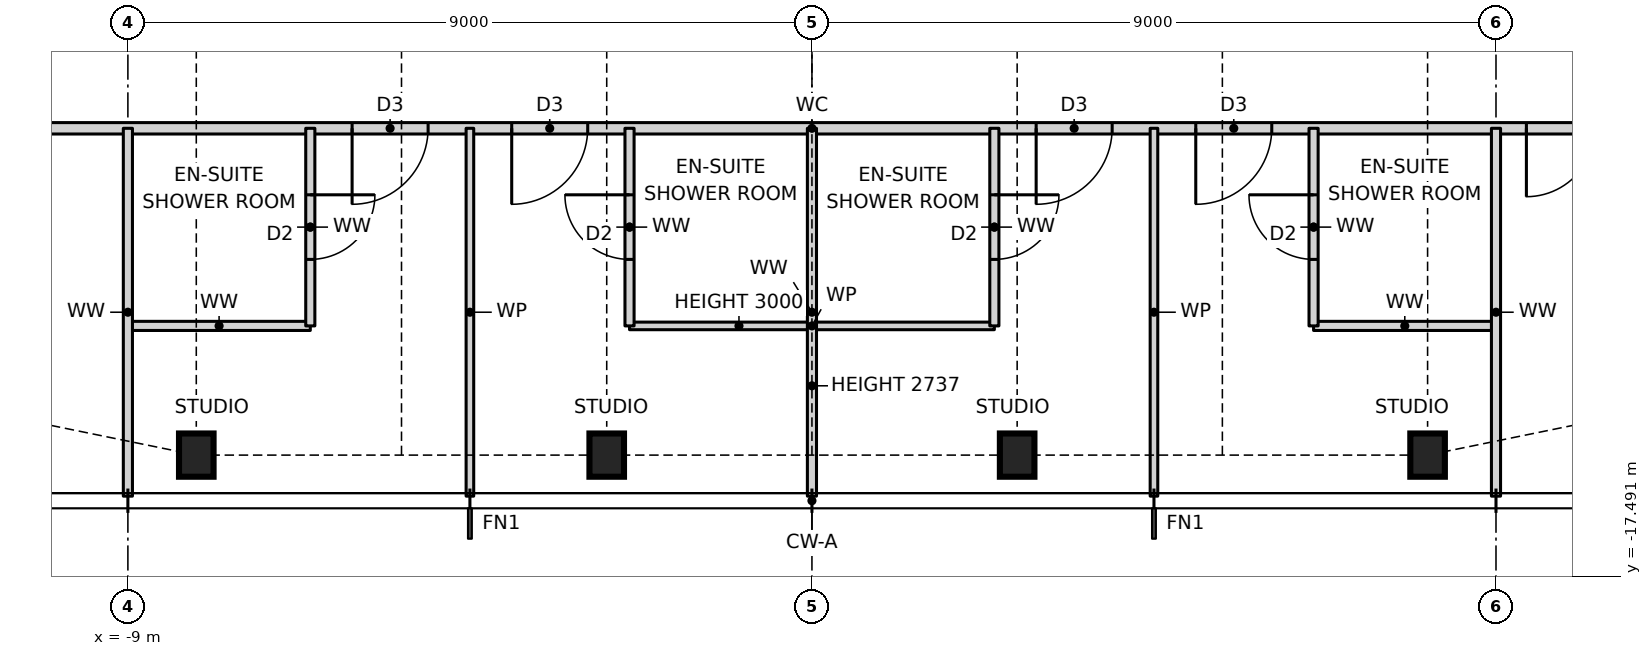
"""IFC4 building model, lengths in metres.
Left out: names, types, materials, properties, quantities, classifications, styles, units other than length and angle.
Written with IfcOpenShell. Run it as: python <this file> out.ifc"""

import sys

from ifc_helpers import new_model, si_unit, direction, frame, frame_2d, origin, origin_2d, place, context, subcontext, project, spatial, rectangle, i_section, extrude, element, fill, save


model = new_model("IFC4")
c1 = context("Model", 3, precision=1e-05, world=origin(), true_north=direction((0.0, 1.0)))
c2 = subcontext(c1, "Body", "Model", "MODEL_VIEW")
j1 = project(units=[si_unit("LENGTHUNIT", "METRE"), si_unit("PLANEANGLEUNIT", "RADIAN")], contexts=[c1])
p1 = place(None, origin())
s1 = spatial("IfcSite", under=j1, at=p1, CompositionType="ELEMENT")
p2 = place(p1, origin())
s2 = spatial("IfcBuilding", under=s1, at=p2, CompositionType="ELEMENT")
p3 = place(p2, frame((0.0, 0.0, 218.5)))
s3 = spatial("IfcBuildingStorey", under=s2, at=p3, CompositionType="ELEMENT", Elevation=218.5)
for number, where, z_axis, x_axis in (
    (1, (-8.1, -15.9, 0.0), (0.0, 0.0, 1.0), (1.0, 0.0, 0.0)),
    (2, (-2.7, -15.9, 0.0), (0.0, 0.0, 1.0), (1.0, 0.0, 0.0)),
    (3, (2.7, -15.9, 0.0), (0.0, 0.0, 1.0), (1.0, 0.0, 0.0)),
    (4, (8.1, -15.9, 0.0), (0.0, 0.0, 1.0), (1.0, 0.0, 0.0)),
):
    element("IfcColumn", number, at=place(p3, frame(where, z_axis=z_axis, x_axis=x_axis)), inside=s3, PredefinedType="COLUMN", context=c2, shape_type="SweptSolid", body=[
        extrude(i_section(OverallWidth=0.455, OverallDepth=0.569, WebThickness=0.078, FlangeThickness=0.125, at=origin_2d()), origin(), (0.0, 0.0, 1.0), 3.5),
    ])
p4 = place(p3, frame((-9.0, -14.2, 0.0), z_axis=(0.0, 0.0, 1.0), x_axis=(1.0, 0.0, 0.0)))
e5 = element("IfcWall", 5, at=p4, inside=s3, PredefinedType="PARTITIONING", context=c2, shape_type="SweptSolid", body=[
    extrude(rectangle(XDim=2.4, YDim=0.12, at=frame_2d((1.2, 0.0))), origin(), (0.0, 0.0, 1.0), 3.27),
])
p5 = place(p3, frame((-2.4, -14.2, 0.0), z_axis=(0.0, 0.0, 1.0), x_axis=(1.0, 0.0, 0.0)))
e6 = element("IfcWall", 6, at=p5, inside=s3, PredefinedType="PARTITIONING", context=c2, shape_type="SweptSolid", body=[
    extrude(rectangle(XDim=4.8, YDim=0.1, at=frame_2d((2.4, 0.0))), origin(), (0.0, 0.0, 1.0), 3.0),
])
p6 = place(p3, frame((6.6, -14.2, 0.0), z_axis=(0.0, 0.0, 1.0), x_axis=(1.0, 0.0, 0.0)))
e7 = element("IfcWall", 7, at=p6, inside=s3, PredefinedType="PARTITIONING", context=c2, shape_type="SweptSolid", body=[
    extrude(rectangle(XDim=2.4, YDim=0.12, at=frame_2d((1.2, 0.0))), origin(), (0.0, 0.0, 1.0), 3.27),
])
p7 = place(p3, frame((-11.6, -11.6, 0.0), z_axis=(0.0, 0.0, 1.0), x_axis=(1.0, 0.0, 0.0)))
e8 = element("IfcWall", 8, at=p7, inside=s3, PredefinedType="PARTITIONING", context=c2, shape_type="SweptSolid", body=[
    extrude(rectangle(XDim=23.2, YDim=0.15, at=frame_2d((11.6, 0.0))), origin(), (0.0, 0.0, 1.0), 3.27),
])
p8 = place(p7, frame((5.55, 0.0, 0.0)))
e9 = element("IfcOpeningElement", 9, at=p8, cuts=e8, PredefinedType="OPENING", context=c2, shape_type="SweptSolid", body=[
    extrude(rectangle(XDim=1.0, YDim=2.1, at=frame_2d((0.5, 1.05))), frame((0.0, 0.085, 0.0), z_axis=(0.0, -1.0, 0.0), x_axis=(1.0, 0.0, 0.0)), (0.0, 0.0, 1.0), 0.17),
])
p9 = place(p7, frame((7.65, 0.0, 0.0)))
e10 = element("IfcOpeningElement", 10, at=p9, cuts=e8, PredefinedType="OPENING", context=c2, shape_type="SweptSolid", body=[
    extrude(rectangle(XDim=1.0, YDim=2.1, at=frame_2d((0.5, 1.05))), frame((0.0, 0.085, 0.0), z_axis=(0.0, -1.0, 0.0), x_axis=(1.0, 0.0, 0.0)), (0.0, 0.0, 1.0), 0.17),
])
p10 = place(p7, frame((14.55, 0.0, 0.0)))
e11 = element("IfcOpeningElement", 11, at=p10, cuts=e8, PredefinedType="OPENING", context=c2, shape_type="SweptSolid", body=[
    extrude(rectangle(XDim=1.0, YDim=2.1, at=frame_2d((0.5, 1.05))), frame((0.0, 0.085, 0.0), z_axis=(0.0, -1.0, 0.0), x_axis=(1.0, 0.0, 0.0)), (0.0, 0.0, 1.0), 0.17),
])
p11 = place(p7, frame((16.65, 0.0, 0.0)))
e12 = element("IfcOpeningElement", 12, at=p11, cuts=e8, PredefinedType="OPENING", context=c2, shape_type="SweptSolid", body=[
    extrude(rectangle(XDim=1.0, YDim=2.1, at=frame_2d((0.5, 1.05))), frame((0.0, 0.085, 0.0), z_axis=(0.0, -1.0, 0.0), x_axis=(1.0, 0.0, 0.0)), (0.0, 0.0, 1.0), 0.17),
])
p12 = place(p7, frame((21.0, 0.0, 0.0)))
e13 = element("IfcOpeningElement", 13, at=p12, cuts=e8, PredefinedType="OPENING", context=c2, shape_type="SweptSolid", body=[
    extrude(rectangle(XDim=1.8, YDim=2.1, at=frame_2d((0.9, 1.05))), frame((0.0, 0.085, 0.0), z_axis=(0.0, -1.0, 0.0), x_axis=(1.0, 0.0, 0.0)), (0.0, 0.0, 1.0), 0.17),
])
p13 = place(p3, frame((9.0, -16.44, 0.0), z_axis=(0.0, 0.0, 1.0), x_axis=(0.0, 1.0, 0.0)))
e14 = element("IfcWall", 14, at=p13, inside=s3, PredefinedType="PARTITIONING", context=c2, shape_type="SweptSolid", body=[
    extrude(rectangle(XDim=4.84, YDim=0.12, at=frame_2d((2.42, 0.0))), origin(), (0.0, 0.0, 1.0), 3.27),
])
p14 = place(p3, frame((6.6, -14.2, 0.0), z_axis=(0.0, 0.0, 1.0), x_axis=(0.0, 1.0, 0.0)))
e15 = element("IfcWall", 15, at=p14, inside=s3, PredefinedType="PARTITIONING", context=c2, shape_type="SweptSolid", body=[
    extrude(rectangle(XDim=2.6, YDim=0.12, at=frame_2d((1.3, 0.0))), origin(), (0.0, 0.0, 1.0), 3.27),
])
p15 = place(p14, frame((0.875, 0.0, 0.0)))
e16 = element("IfcOpeningElement", 16, at=p15, cuts=e15, PredefinedType="OPENING", context=c2, shape_type="SweptSolid", body=[
    extrude(rectangle(XDim=0.85, YDim=2.1, at=frame_2d((0.425, 1.05))), frame((0.0, 0.07, 0.0), z_axis=(0.0, -1.0, 0.0), x_axis=(1.0, 0.0, 0.0)), (0.0, 0.0, 1.0), 0.14),
])
p16 = place(p3, frame((4.5, -16.44, 0.0), z_axis=(0.0, 0.0, 1.0), x_axis=(0.0, 1.0, 0.0)))
e17 = element("IfcWall", 17, at=p16, inside=s3, PredefinedType="PARTITIONING", context=c2, shape_type="SweptSolid", body=[
    extrude(rectangle(XDim=4.84, YDim=0.1, at=frame_2d((2.42, 0.0))), origin(), (0.0, 0.0, 1.0), 3.27),
])
p17 = place(p3, frame((2.4, -14.2, 0.0), z_axis=(0.0, 0.0, 1.0), x_axis=(0.0, 1.0, 0.0)))
e18 = element("IfcWall", 18, at=p17, inside=s3, PredefinedType="PARTITIONING", context=c2, shape_type="SweptSolid", body=[
    extrude(rectangle(XDim=2.6, YDim=0.12, at=frame_2d((1.3, 0.0))), origin(), (0.0, 0.0, 1.0), 3.27),
])
p18 = place(p17, frame((0.875, 0.0, 0.0)))
e19 = element("IfcOpeningElement", 19, at=p18, cuts=e18, PredefinedType="OPENING", context=c2, shape_type="SweptSolid", body=[
    extrude(rectangle(XDim=0.85, YDim=2.1, at=frame_2d((0.425, 1.05))), frame((0.0, 0.07, 0.0), z_axis=(0.0, -1.0, 0.0), x_axis=(1.0, 0.0, 0.0)), (0.0, 0.0, 1.0), 0.14),
])
p19 = place(p3, frame((0.0, -16.44, 0.0), z_axis=(0.0, 0.0, 1.0), x_axis=(0.0, 1.0, 0.0)))
e20 = element("IfcWall", 20, at=p19, inside=s3, PredefinedType="PARTITIONING", context=c2, shape_type="SweptSolid", body=[
    extrude(rectangle(XDim=4.84, YDim=0.12, at=frame_2d((2.42, 0.0))), origin(), (0.0, 0.0, 1.0), 2.737),
])
p20 = place(p3, frame((-2.4, -14.2, 0.0), z_axis=(0.0, 0.0, 1.0), x_axis=(0.0, 1.0, 0.0)))
e21 = element("IfcWall", 21, at=p20, inside=s3, PredefinedType="PARTITIONING", context=c2, shape_type="SweptSolid", body=[
    extrude(rectangle(XDim=2.6, YDim=0.12, at=frame_2d((1.3, 0.0))), origin(), (0.0, 0.0, 1.0), 3.27),
])
p21 = place(p20, frame((0.875, 0.0, 0.0)))
e22 = element("IfcOpeningElement", 22, at=p21, cuts=e21, PredefinedType="OPENING", context=c2, shape_type="SweptSolid", body=[
    extrude(rectangle(XDim=0.85, YDim=2.1, at=frame_2d((0.425, 1.05))), frame((0.0, 0.07, 0.0), z_axis=(0.0, -1.0, 0.0), x_axis=(1.0, 0.0, 0.0)), (0.0, 0.0, 1.0), 0.14),
])
p22 = place(p3, frame((-4.5, -16.44, 0.0), z_axis=(0.0, 0.0, 1.0), x_axis=(0.0, 1.0, 0.0)))
e23 = element("IfcWall", 23, at=p22, inside=s3, PredefinedType="PARTITIONING", context=c2, shape_type="SweptSolid", body=[
    extrude(rectangle(XDim=4.84, YDim=0.1, at=frame_2d((2.42, 0.0))), origin(), (0.0, 0.0, 1.0), 3.27),
])
p23 = place(p3, frame((-6.6, -14.2, 0.0), z_axis=(0.0, 0.0, 1.0), x_axis=(0.0, 1.0, 0.0)))
e24 = element("IfcWall", 24, at=p23, inside=s3, PredefinedType="PARTITIONING", context=c2, shape_type="SweptSolid", body=[
    extrude(rectangle(XDim=2.6, YDim=0.12, at=frame_2d((1.3, 0.0))), origin(), (0.0, 0.0, 1.0), 3.27),
])
p24 = place(p23, frame((0.875, 0.0, 0.0)))
e25 = element("IfcOpeningElement", 25, at=p24, cuts=e24, PredefinedType="OPENING", context=c2, shape_type="SweptSolid", body=[
    extrude(rectangle(XDim=0.85, YDim=2.1, at=frame_2d((0.425, 1.05))), frame((0.0, 0.07, 0.0), z_axis=(0.0, -1.0, 0.0), x_axis=(1.0, 0.0, 0.0)), (0.0, 0.0, 1.0), 0.14),
])
p25 = place(p3, frame((-9.0, -16.44, 0.0), z_axis=(0.0, 0.0, 1.0), x_axis=(0.0, 1.0, 0.0)))
e26 = element("IfcWall", 26, at=p25, inside=s3, PredefinedType="PARTITIONING", context=c2, shape_type="SweptSolid", body=[
    extrude(rectangle(XDim=4.84, YDim=0.12, at=frame_2d((2.42, 0.0))), origin(), (0.0, 0.0, 1.0), 3.27),
])
p26 = place(p8, frame((1.0, 0.0, 0.0), z_axis=(0.0, 0.0, 1.0), x_axis=(-1.0, 0.0, 0.0)))
e27 = element("IfcDoor", 27, at=p26, inside=s3, OperationType="SINGLE_SWING_RIGHT", PredefinedType="DOOR", context=c2, shape_type="SweptSolid", body=[
    extrude(rectangle(XDim=1.0, YDim=2.1, at=frame_2d((0.5, 1.05))), frame((0.0, 0.025, 0.0), z_axis=(0.0, -1.0, 0.0), x_axis=(1.0, 0.0, 0.0)), (0.0, 0.0, 1.0), 0.05),
])
fill(e9, e27)
p27 = place(p24, frame((0.85, 0.0, 0.0), z_axis=(0.0, 0.0, 1.0), x_axis=(-1.0, 0.0, 0.0)))
e28 = element("IfcDoor", 28, at=p27, inside=s3, OperationType="SINGLE_SWING_LEFT", PredefinedType="DOOR", context=c2, shape_type="SweptSolid", body=[
    extrude(rectangle(XDim=0.85, YDim=2.1, at=frame_2d((0.425, 1.05))), frame((0.0, 0.025, 0.0), z_axis=(0.0, -1.0, 0.0), x_axis=(1.0, 0.0, 0.0)), (0.0, 0.0, 1.0), 0.05),
])
fill(e25, e28)
p28 = place(p9, frame((1.0, 0.0, 0.0), z_axis=(0.0, 0.0, 1.0), x_axis=(-1.0, 0.0, 0.0)))
e29 = element("IfcDoor", 29, at=p28, inside=s3, OperationType="SINGLE_SWING_RIGHT", PredefinedType="DOOR", context=c2, shape_type="SweptSolid", body=[
    extrude(rectangle(XDim=1.0, YDim=2.1, at=frame_2d((0.5, 1.05))), frame((0.0, 0.025, 0.0), z_axis=(0.0, -1.0, 0.0), x_axis=(1.0, 0.0, 0.0)), (0.0, 0.0, 1.0), 0.05),
])
fill(e10, e29)
p29 = place(p21, origin())
e30 = element("IfcDoor", 30, at=p29, inside=s3, OperationType="SINGLE_SWING_RIGHT", PredefinedType="DOOR", context=c2, shape_type="SweptSolid", body=[
    extrude(rectangle(XDim=0.85, YDim=2.1, at=frame_2d((0.425, 1.05))), frame((0.0, 0.025, 0.0), z_axis=(0.0, -1.0, 0.0), x_axis=(1.0, 0.0, 0.0)), (0.0, 0.0, 1.0), 0.05),
])
fill(e22, e30)
p30 = place(p10, frame((1.0, 0.0, 0.0), z_axis=(0.0, 0.0, 1.0), x_axis=(-1.0, 0.0, 0.0)))
e31 = element("IfcDoor", 31, at=p30, inside=s3, OperationType="SINGLE_SWING_RIGHT", PredefinedType="DOOR", context=c2, shape_type="SweptSolid", body=[
    extrude(rectangle(XDim=1.0, YDim=2.1, at=frame_2d((0.5, 1.05))), frame((0.0, 0.025, 0.0), z_axis=(0.0, -1.0, 0.0), x_axis=(1.0, 0.0, 0.0)), (0.0, 0.0, 1.0), 0.05),
])
fill(e11, e31)
p31 = place(p18, frame((0.85, 0.0, 0.0), z_axis=(0.0, 0.0, 1.0), x_axis=(-1.0, 0.0, 0.0)))
e32 = element("IfcDoor", 32, at=p31, inside=s3, OperationType="SINGLE_SWING_LEFT", PredefinedType="DOOR", context=c2, shape_type="SweptSolid", body=[
    extrude(rectangle(XDim=0.85, YDim=2.1, at=frame_2d((0.425, 1.05))), frame((0.0, 0.025, 0.0), z_axis=(0.0, -1.0, 0.0), x_axis=(1.0, 0.0, 0.0)), (0.0, 0.0, 1.0), 0.05),
])
fill(e19, e32)
p32 = place(p11, frame((1.0, 0.0, 0.0), z_axis=(0.0, 0.0, 1.0), x_axis=(-1.0, 0.0, 0.0)))
e33 = element("IfcDoor", 33, at=p32, inside=s3, OperationType="SINGLE_SWING_RIGHT", PredefinedType="DOOR", context=c2, shape_type="SweptSolid", body=[
    extrude(rectangle(XDim=1.0, YDim=2.1, at=frame_2d((0.5, 1.05))), frame((0.0, 0.025, 0.0), z_axis=(0.0, -1.0, 0.0), x_axis=(1.0, 0.0, 0.0)), (0.0, 0.0, 1.0), 0.05),
])
fill(e12, e33)
p33 = place(p15, origin())
e34 = element("IfcDoor", 34, at=p33, inside=s3, OperationType="SINGLE_SWING_RIGHT", PredefinedType="DOOR", context=c2, shape_type="SweptSolid", body=[
    extrude(rectangle(XDim=0.85, YDim=2.1, at=frame_2d((0.425, 1.05))), frame((0.0, 0.025, 0.0), z_axis=(0.0, -1.0, 0.0), x_axis=(1.0, 0.0, 0.0)), (0.0, 0.0, 1.0), 0.05),
])
fill(e16, e34)
p34 = place(p12, frame((1.8, 0.0, 0.0), z_axis=(0.0, 0.0, 1.0), x_axis=(-1.0, 0.0, 0.0)))
e35 = element("IfcDoor", 35, at=p34, inside=s3, OperationType="DOUBLE_DOOR_SINGLE_SWING", PredefinedType="DOOR", context=c2, shape_type="SweptSolid", body=[
    extrude(rectangle(XDim=1.8, YDim=2.1, at=frame_2d((0.9, 1.05))), frame((0.0, 0.025, 0.0), z_axis=(0.0, -1.0, 0.0), x_axis=(1.0, 0.0, 0.0)), (0.0, 0.0, 1.0), 0.05),
])
fill(e13, e35)
save(model, sys.argv[1])
